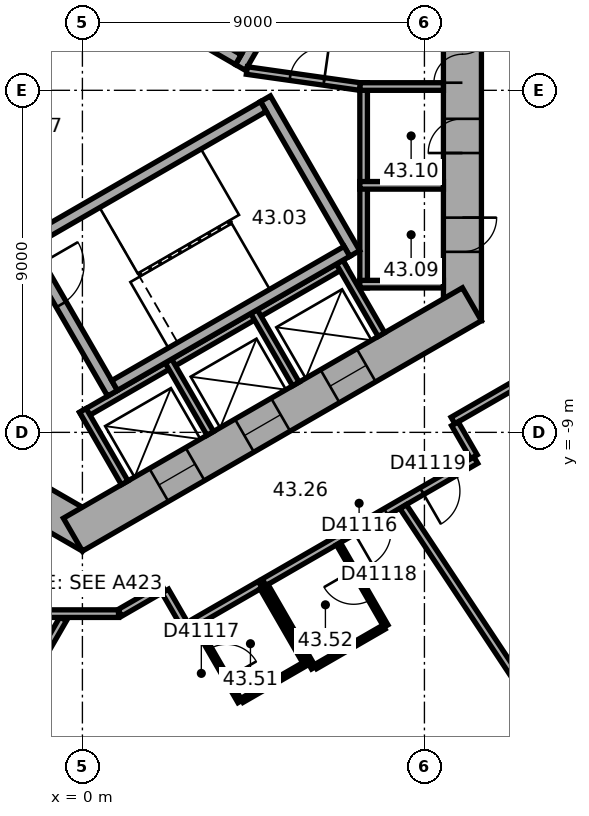
"""IFC4 building model, lengths in metres.
Left out: names, types, materials, properties, quantities, classifications, styles, units other than length and angle.
Written with IfcOpenShell. Run it as: python <this file> out.ifc"""

import sys

from ifc_helpers import new_model, si_unit, direction, frame, frame_2d, origin, place, context, subcontext, project, spatial, rectangle, extrude, element, fill, save


model = new_model("IFC4")
c1 = context("Model", 3, precision=1e-05, world=origin(), true_north=direction((0.0, 1.0)))
c2 = subcontext(c1, "Body", "Model", "MODEL_VIEW")
j1 = project(units=[si_unit("LENGTHUNIT", "METRE"), si_unit("PLANEANGLEUNIT", "RADIAN")], contexts=[c1])
p1 = place(None, origin())
s1 = spatial("IfcSite", under=j1, at=p1, CompositionType="ELEMENT")
p2 = place(p1, origin())
s2 = spatial("IfcBuilding", under=s1, at=p2, CompositionType="ELEMENT")
p3 = place(p2, frame((0.0, 0.0, 176.2)))
s3 = spatial("IfcBuildingStorey", under=s2, at=p3, CompositionType="ELEMENT", Elevation=176.2)
p4 = place(p3, frame((10.0, -6.062, 0.0), z_axis=(0.0, 0.0, 1.0), x_axis=(0.0, 1.0, 0.0)))
e1 = element("IfcWall", 1, at=p4, inside=s3, PredefinedType="SHEAR", context=c2, shape_type="SweptSolid", body=[
    extrude(rectangle(XDim=12.125, YDim=1.0, at=frame_2d((6.062, 0.0))), origin(), (0.0, 0.0, 1.0), 3.7),
])
p5 = place(p4, frame((6.262, 0.0, 0.0)))
e2 = element("IfcOpeningElement", 2, at=p5, cuts=e1, PredefinedType="OPENING", context=c2, shape_type="SweptSolid", body=[
    extrude(rectangle(XDim=1.5, YDim=2.1, at=frame_2d((0.75, 1.05))), frame((0.0, 0.51, 0.0), z_axis=(0.0, -1.0, 0.0), x_axis=(1.0, 0.0, 0.0)), (0.0, 0.0, 1.0), 1.02),
])
p6 = place(p4, frame((1.812, 0.0, 0.0)))
e3 = element("IfcOpeningElement", 3, at=p6, cuts=e1, PredefinedType="OPENING", context=c2, shape_type="SweptSolid", body=[
    extrude(rectangle(XDim=0.9, YDim=2.1, at=frame_2d((0.45, 1.05))), frame((0.0, 0.51, 0.0), z_axis=(0.0, -1.0, 0.0), x_axis=(1.0, 0.0, 0.0)), (0.0, 0.0, 1.0), 1.02),
])
p7 = place(p4, frame((4.412, 0.0, 0.0)))
e4 = element("IfcOpeningElement", 4, at=p7, cuts=e1, PredefinedType="OPENING", context=c2, shape_type="SweptSolid", body=[
    extrude(rectangle(XDim=0.9, YDim=2.1, at=frame_2d((0.45, 1.05))), frame((0.0, 0.51, 0.0), z_axis=(0.0, -1.0, 0.0), x_axis=(1.0, 0.0, 0.0)), (0.0, 0.0, 1.0), 1.02),
])
p8 = place(p3, frame((-10.25, -5.629, 0.0), z_axis=(0.0, 0.0, 1.0), x_axis=(0.866022616891, -0.50000482701, 0.0)))
e5 = element("IfcWall", 5, at=p8, inside=s3, PredefinedType="SHEAR", context=c2, shape_type="SweptSolid", body=[
    extrude(rectangle(XDim=12.125, YDim=1.0, at=frame_2d((6.062, 0.0))), origin(), (0.0, 0.0, 1.0), 3.7),
])
p9 = place(p8, frame((6.262, 0.0, 0.0)))
e6 = element("IfcOpeningElement", 6, at=p9, cuts=e5, PredefinedType="OPENING", context=c2, shape_type="SweptSolid", body=[
    extrude(rectangle(XDim=1.5, YDim=2.1, at=frame_2d((0.75, 1.05))), frame((0.0, 0.51, 0.0), z_axis=(0.0, -1.0, 0.0), x_axis=(1.0, 0.0, 0.0)), (0.0, 0.0, 1.0), 1.02),
])
p10 = place(p8, frame((1.712, 0.0, 0.0)))
e7 = element("IfcOpeningElement", 7, at=p10, cuts=e5, PredefinedType="OPENING", context=c2, shape_type="SweptSolid", body=[
    extrude(rectangle(XDim=1.1, YDim=2.1, at=frame_2d((0.55, 1.05))), frame((0.0, 0.51, 0.0), z_axis=(0.0, -1.0, 0.0), x_axis=(1.0, 0.0, 0.0)), (0.0, 0.0, 1.0), 1.02),
])
p11 = place(p8, frame((4.312, 0.0, 0.0)))
e8 = element("IfcOpeningElement", 8, at=p11, cuts=e5, PredefinedType="OPENING", context=c2, shape_type="SweptSolid", body=[
    extrude(rectangle(XDim=1.1, YDim=2.1, at=frame_2d((0.55, 1.05))), frame((0.0, 0.51, 0.0), z_axis=(0.0, -1.0, 0.0), x_axis=(1.0, 0.0, 0.0)), (0.0, 0.0, 1.0), 1.02),
])
p12 = place(p3, frame((-0.25, -11.691, 0.0), z_axis=(0.0, 0.0, 1.0), x_axis=(0.866022616891, 0.50000482701, 0.0)))
e9 = element("IfcWall", 9, at=p12, inside=s3, PredefinedType="SHEAR", context=c2, shape_type="SweptSolid", body=[
    extrude(rectangle(XDim=12.125, YDim=1.0, at=frame_2d((6.062, 0.0))), origin(), (0.0, 0.0, 1.0), 3.7),
])
p13 = place(p12, frame((2.612, 0.0, 0.0)))
e10 = element("IfcOpeningElement", 10, at=p13, cuts=e9, PredefinedType="OPENING", context=c2, shape_type="SweptSolid", body=[
    extrude(rectangle(XDim=1.1, YDim=2.1, at=frame_2d((0.55, 1.05))), frame((0.0, 0.51, 0.0), z_axis=(0.0, -1.0, 0.0), x_axis=(1.0, 0.0, 0.0)), (0.0, 0.0, 1.0), 1.02),
])
p14 = place(p12, frame((5.212, 0.0, 0.0)))
e11 = element("IfcOpeningElement", 11, at=p14, cuts=e9, PredefinedType="OPENING", context=c2, shape_type="SweptSolid", body=[
    extrude(rectangle(XDim=1.1, YDim=2.1, at=frame_2d((0.55, 1.05))), frame((0.0, 0.51, 0.0), z_axis=(0.0, -1.0, 0.0), x_axis=(1.0, 0.0, 0.0)), (0.0, 0.0, 1.0), 1.02),
])
p15 = place(p12, frame((7.812, 0.0, 0.0)))
e12 = element("IfcOpeningElement", 12, at=p15, cuts=e9, PredefinedType="OPENING", context=c2, shape_type="SweptSolid", body=[
    extrude(rectangle(XDim=1.1, YDim=2.1, at=frame_2d((0.55, 1.05))), frame((0.0, 0.51, 0.0), z_axis=(0.0, -1.0, 0.0), x_axis=(1.0, 0.0, 0.0)), (0.0, 0.0, 1.0), 1.02),
])
p16 = place(p3, frame((2.911, -24.156, 0.0), z_axis=(0.0, 0.0, 1.0), x_axis=(0.833882163564, 0.551942512668, 0.0)))
e13 = element("IfcWall", 13, at=p16, inside=s3, PredefinedType="STANDARD", context=c2, shape_type="SweptSolid", body=[
    extrude(rectangle(XDim=20.044, YDim=0.2, at=frame_2d((10.022, 0.0))), origin(), (0.0, 0.0, 1.0), 3.7),
])
p17 = place(p16, frame((1.313, 0.0, 0.9)))
e14 = element("IfcOpeningElement", 14, at=p17, cuts=e13, PredefinedType="OPENING", context=c2, shape_type="SweptSolid", body=[
    extrude(rectangle(XDim=2.4, YDim=2.0, at=frame_2d((1.2, 1.0))), frame((0.0, 0.11, 0.0), z_axis=(0.0, -1.0, 0.0), x_axis=(1.0, 0.0, 0.0)), (0.0, 0.0, 1.0), 0.22),
])
p18 = place(p16, frame((5.067, 0.0, 0.9)))
e15 = element("IfcOpeningElement", 15, at=p18, cuts=e13, PredefinedType="OPENING", context=c2, shape_type="SweptSolid", body=[
    extrude(rectangle(XDim=2.4, YDim=2.0, at=frame_2d((1.2, 1.0))), frame((0.0, 0.11, 0.0), z_axis=(0.0, -1.0, 0.0), x_axis=(1.0, 0.0, 0.0)), (0.0, 0.0, 1.0), 0.22),
])
p19 = place(p16, frame((8.821, 0.0, 0.9)))
e16 = element("IfcOpeningElement", 16, at=p19, cuts=e13, PredefinedType="OPENING", context=c2, shape_type="SweptSolid", body=[
    extrude(rectangle(XDim=2.4, YDim=2.0, at=frame_2d((1.2, 1.0))), frame((0.0, 0.11, 0.0), z_axis=(0.0, -1.0, 0.0), x_axis=(1.0, 0.0, 0.0)), (0.0, 0.0, 1.0), 0.22),
])
p20 = place(p16, frame((12.575, 0.0, 0.9)))
e17 = element("IfcOpeningElement", 17, at=p20, cuts=e13, PredefinedType="OPENING", context=c2, shape_type="SweptSolid", body=[
    extrude(rectangle(XDim=2.4, YDim=2.0, at=frame_2d((1.2, 1.0))), frame((0.0, 0.11, 0.0), z_axis=(0.0, -1.0, 0.0), x_axis=(1.0, 0.0, 0.0)), (0.0, 0.0, 1.0), 0.22),
])
p21 = place(p16, frame((16.329, 0.0, 0.9)))
e18 = element("IfcOpeningElement", 18, at=p21, cuts=e13, PredefinedType="OPENING", context=c2, shape_type="SweptSolid", body=[
    extrude(rectangle(XDim=2.4, YDim=2.0, at=frame_2d((1.2, 1.0))), frame((0.0, 0.11, 0.0), z_axis=(0.0, -1.0, 0.0), x_axis=(1.0, 0.0, 0.0)), (0.0, 0.0, 1.0), 0.22),
])
p22 = place(p3, frame((7.4, -5.2, 0.0), z_axis=(0.0, 0.0, 1.0), x_axis=(0.0, 1.0, 0.0)))
e19 = element("IfcWall", 19, at=p22, inside=s3, PredefinedType="PARTITIONING", context=c2, shape_type="SweptSolid", body=[
    extrude(rectangle(XDim=5.4, YDim=0.2, at=frame_2d((2.7, 0.0))), origin(), (0.0, 0.0, 1.0), 3.42),
])
for number, where, z_axis, x_axis in (
    (20, (7.3, -5.1, 0.0), (0.0, 0.0, 1.0), (1.0, 0.0, 0.0)),
    (21, (7.3, -2.5, 0.0), (0.0, 0.0, 1.0), (1.0, 0.0, 0.0)),
    (22, (7.3, 0.1, 0.0), (0.0, 0.0, 1.0), (1.0, 0.0, 0.0)),
):
    element("IfcWall", number, at=place(p3, frame(where, z_axis=z_axis, x_axis=x_axis)), inside=s3, PredefinedType="PARTITIONING", context=c2, shape_type="SweptSolid", body=[
        extrude(rectangle(XDim=2.2, YDim=0.2, at=frame_2d((1.1, 0.0))), origin(), (0.0, 0.0, 1.0), 3.42),
    ])
p23 = place(p3, frame((-0.024, -8.559, 0.0), z_axis=(0.0, 0.0, 1.0), x_axis=(0.866026010844, 0.49999894854, 0.0)))
e23 = element("IfcWall", 23, at=p23, inside=s3, PredefinedType="PARTITIONING", context=c2, shape_type="SweptSolid", body=[
    extrude(rectangle(XDim=8.0, YDim=0.2, at=frame_2d((4.0, 0.0))), origin(), (0.0, 0.0, 1.0), 3.42),
])
for number, where, z_axis, x_axis in (
    (24, (0.013, -8.422, 0.0), (0.0, 0.0, 1.0), (0.5, -0.866, 0.0)),
    (25, (2.264, -7.122, 0.0), (0.0, 0.0, 1.0), (0.5, -0.866, 0.0)),
    (26, (4.516, -5.822, 0.0), (0.0, 0.0, 1.0), (0.5, -0.866, 0.0)),
    (27, (6.768, -4.522, 0.0), (0.0, 0.0, 1.0), (0.5, -0.866, 0.0)),
):
    element("IfcWall", number, at=place(p3, frame(where, z_axis=z_axis, x_axis=x_axis)), inside=s3, PredefinedType="PARTITIONING", context=c2, shape_type="SweptSolid", body=[
        extrude(rectangle(XDim=2.2, YDim=0.2, at=frame_2d((1.1, 0.0))), origin(), (0.0, 0.0, 1.0), 3.42),
    ])
p24 = place(p3, frame((4.158, 0.602, 0.0), z_axis=(0.0, 0.0, 1.0), x_axis=(0.499977259774, 0.866038532462, 0.0)))
e28 = element("IfcWall", 28, at=p24, inside=s3, PredefinedType="SHEAR", context=c2, shape_type="SweptSolid", body=[
    extrude(rectangle(XDim=4.7, YDim=0.3, at=frame_2d((2.35, 0.0))), origin(), (0.0, 0.0, 1.0), 3.42),
])
p25 = place(p24, frame((0.8, 0.0, 0.0)))
e29 = element("IfcOpeningElement", 29, at=p25, cuts=e28, PredefinedType="OPENING", context=c2, shape_type="SweptSolid", body=[
    extrude(rectangle(XDim=1.2, YDim=2.1, at=frame_2d((0.6, 1.05))), frame((0.0, 0.16, 0.0), z_axis=(0.0, -1.0, 0.0), x_axis=(1.0, 0.0, 0.0)), (0.0, 0.0, 1.0), 0.32),
])
p26 = place(p3, frame((4.103, 0.807, 0.0), z_axis=(0.0, 0.0, 1.0), x_axis=(-0.866027801685, 0.499995846692, 0.0)))
e30 = element("IfcWall", 30, at=p26, inside=s3, PredefinedType="SHEAR", context=c2, shape_type="SweptSolid", body=[
    extrude(rectangle(XDim=7.06, YDim=0.3, at=frame_2d((3.53, 0.0))), origin(), (0.0, 0.0, 1.0), 3.42),
])
p27 = place(p3, frame((-1.558, -3.902, 0.0), z_axis=(0.0, 0.0, 1.0), x_axis=(0.499977259774, -0.866038532462, 0.0)))
e31 = element("IfcWall", 31, at=p27, inside=s3, PredefinedType="SHEAR", context=c2, shape_type="SweptSolid", body=[
    extrude(rectangle(XDim=4.7, YDim=0.3, at=frame_2d((2.35, 0.0))), origin(), (0.0, 0.0, 1.0), 3.42),
])
p28 = place(p27, frame((0.8, 0.0, 0.0)))
e32 = element("IfcOpeningElement", 32, at=p28, cuts=e31, PredefinedType="OPENING", context=c2, shape_type="SweptSolid", body=[
    extrude(rectangle(XDim=1.2, YDim=2.1, at=frame_2d((0.6, 1.05))), frame((0.0, 0.16, 0.0), z_axis=(0.0, -1.0, 0.0), x_axis=(1.0, 0.0, 0.0)), (0.0, 0.0, 1.0), 0.32),
])
p29 = place(p3, frame((4.816, -0.222, 0.0), z_axis=(0.0, 0.0, 1.0), x_axis=(0.499977259774, -0.866038532462, 0.0)))
e33 = element("IfcWall", 33, at=p29, inside=s3, PredefinedType="SHEAR", context=c2, shape_type="SweptSolid", body=[
    extrude(rectangle(XDim=4.7, YDim=0.3, at=frame_2d((2.35, 0.0))), origin(), (0.0, 0.0, 1.0), 3.42),
])
for number, where, z_axis, x_axis in (
    (34, (-1.353, -3.957, 0.0), (0.0, 0.0, 1.0), (0.866, 0.5, 0.0)),
    (35, (0.847, -7.767, 0.0), (0.0, 0.0, 1.0), (0.866, 0.5, 0.0)),
):
    element("IfcWall", number, at=place(p3, frame(where, z_axis=z_axis, x_axis=x_axis)), inside=s3, PredefinedType="SHEAR", context=c2, shape_type="SweptSolid", body=[
        extrude(rectangle(XDim=7.06, YDim=0.3, at=frame_2d((3.53, 0.0))), origin(), (0.0, 0.0, 1.0), 3.42),
    ])
p30 = place(p3, frame((4.327, 0.521, 0.0), z_axis=(0.0, 0.0, 1.0), x_axis=(0.990124376366, -0.14019172346, 0.0)))
e36 = element("IfcWall", 36, at=p30, inside=s3, PredefinedType="PARTITIONING", context=c2, shape_type="SweptSolid", body=[
    extrude(rectangle(XDim=3.002, YDim=0.2, at=frame_2d((1.501, 0.0))), origin(), (0.0, 0.0, 1.0), 3.42),
])
p31 = place(p30, frame((1.15, 0.0, 0.0)))
e37 = element("IfcOpeningElement", 37, at=p31, cuts=e36, PredefinedType="OPENING", context=c2, shape_type="SweptSolid", body=[
    extrude(rectangle(XDim=0.9, YDim=2.1, at=frame_2d((0.45, 1.05))), frame((0.0, 0.11, 0.0), z_axis=(0.0, -1.0, 0.0), x_axis=(1.0, 0.0, 0.0)), (0.0, 0.0, 1.0), 0.22),
])
p32 = place(p3, frame((-4.732, -21.228, 0.0), z_axis=(0.0, 0.0, 1.0), x_axis=(0.500000843414, 0.866024916838, 0.0)))
e38 = element("IfcWall", 38, at=p32, inside=s3, PredefinedType="PARTITIONING", context=c2, shape_type="SweptSolid", body=[
    extrude(rectangle(XDim=8.452, YDim=0.2, at=frame_2d((4.226, 0.0))), origin(), (0.0, 0.0, 1.0), 3.42),
])
p33 = place(p3, frame((-0.91, -13.77, 0.0), z_axis=(0.0, 0.0, 1.0), x_axis=(1.0, 0.0, 0.0)))
e39 = element("IfcWall", 39, at=p33, inside=s3, PredefinedType="PARTITIONING", context=c2, shape_type="SweptSolid", body=[
    extrude(rectangle(XDim=1.86, YDim=0.2, at=frame_2d((0.93, 0.0))), origin(), (0.0, 0.0, 1.0), 3.42),
])
p34 = place(p3, frame((0.985, -13.75, 0.0), z_axis=(0.0, 0.0, 1.0), x_axis=(0.866028661061, 0.499994358189, 0.0)))
e40 = element("IfcWall", 40, at=p34, inside=s3, PredefinedType="PARTITIONING", context=c2, shape_type="SweptSolid", body=[
    extrude(rectangle(XDim=1.321, YDim=0.2, at=frame_2d((0.661, 0.0))), origin(), (0.0, 0.0, 1.0), 3.42),
])
p35 = place(p3, frame((2.179, -13.176, 0.0), z_axis=(0.0, 0.0, 1.0), x_axis=(0.499978356969, -0.866037899034, 0.0)))
e41 = element("IfcWall", 41, at=p35, inside=s3, PredefinedType="PARTITIONING", context=c2, shape_type="SweptSolid", body=[
    extrude(rectangle(XDim=1.101, YDim=0.2, at=frame_2d((0.551, 0.0))), origin(), (0.0, 0.0, 1.0), 3.42),
])
p36 = place(p3, frame((2.946, -14.004, 0.0), z_axis=(0.0, 0.0, 1.0), x_axis=(0.866041268327, 0.499972520799, 0.0)))
e42 = element("IfcWall", 42, at=p36, inside=s3, PredefinedType="PARTITIONING", context=c2, shape_type="SweptSolid", body=[
    extrude(rectangle(XDim=2.0, YDim=0.2, at=frame_2d((1.0, 0.0))), origin(), (0.0, 0.0, 1.0), 3.42),
])
p37 = place(p3, frame((4.146, -16.083, 0.0), z_axis=(0.0, 0.0, 1.0), x_axis=(-0.499952165731, 0.866053019151, 0.0)))
e43 = element("IfcWall", 43, at=p37, inside=s3, PredefinedType="PARTITIONING", context=c2, shape_type="SweptSolid", body=[
    extrude(rectangle(XDim=2.3, YDim=0.12, at=frame_2d((1.15, 0.0))), origin(), (0.0, 0.0, 1.0), 3.42),
])
p38 = place(p37, frame((0.7, 0.0, 0.0)))
e44 = element("IfcOpeningElement", 44, at=p38, cuts=e43, PredefinedType="OPENING", context=c2, shape_type="SweptSolid", body=[
    extrude(rectangle(XDim=0.9, YDim=2.1, at=frame_2d((0.45, 1.05))), frame((0.0, 0.07, 0.0), z_axis=(0.0, -1.0, 0.0), x_axis=(1.0, 0.0, 0.0)), (0.0, 0.0, 1.0), 0.14),
])
p39 = place(p3, frame((4.728, -13.091, 0.0), z_axis=(0.0, 0.0, 1.0), x_axis=(0.500031774688, -0.866007057882, 0.0)))
e45 = element("IfcWall", 45, at=p39, inside=s3, PredefinedType="PARTITIONING", context=c2, shape_type="SweptSolid", body=[
    extrude(rectangle(XDim=2.3, YDim=0.12, at=frame_2d((1.15, 0.0))), origin(), (0.0, 0.0, 1.0), 3.42),
])
p40 = place(p3, frame((4.782, -12.944, 0.0), z_axis=(0.0, 0.0, 1.0), x_axis=(0.866022506829, 0.50000501764, 0.0)))
e46 = element("IfcWall", 46, at=p40, inside=s3, PredefinedType="PARTITIONING", context=c2, shape_type="SweptSolid", body=[
    extrude(rectangle(XDim=6.432, YDim=0.2, at=frame_2d((3.216, 0.0))), origin(), (0.0, 0.0, 1.0), 3.42),
])
p41 = place(p40, frame((2.704, 0.0, 0.0)))
e47 = element("IfcOpeningElement", 47, at=p41, cuts=e46, PredefinedType="OPENING", context=c2, shape_type="SweptSolid", body=[
    extrude(rectangle(XDim=1.0, YDim=2.1, at=frame_2d((0.5, 1.05))), frame((0.0, 0.11, 0.0), z_axis=(0.0, -1.0, 0.0), x_axis=(1.0, 0.0, 0.0)), (0.0, 0.0, 1.0), 0.22),
])
p42 = place(p40, frame((4.795, 0.0, 0.0)))
e48 = element("IfcOpeningElement", 48, at=p42, cuts=e46, PredefinedType="OPENING", context=c2, shape_type="SweptSolid", body=[
    extrude(rectangle(XDim=1.0, YDim=2.1, at=frame_2d((0.5, 1.05))), frame((0.0, 0.11, 0.0), z_axis=(0.0, -1.0, 0.0), x_axis=(1.0, 0.0, 0.0)), (0.0, 0.0, 1.0), 0.22),
])
p43 = place(p3, frame((5.826, -15.113, 0.0), z_axis=(0.0, 0.0, 1.0), x_axis=(-0.866045024864, -0.499966013754, 0.0)))
e49 = element("IfcWall", 49, at=p43, inside=s3, PredefinedType="PARTITIONING", context=c2, shape_type="SweptSolid", body=[
    extrude(rectangle(XDim=1.88, YDim=0.12, at=frame_2d((0.94, 0.0))), origin(), (0.0, 0.0, 1.0), 3.42),
])
p44 = place(p3, frame((6.082, -15.196, 0.0), z_axis=(0.0, 0.0, 1.0), x_axis=(-0.500004234368, 0.866022959057, 0.0)))
e50 = element("IfcWall", 50, at=p44, inside=s3, PredefinedType="PARTITIONING", context=c2, shape_type="SweptSolid", body=[
    extrude(rectangle(XDim=2.5, YDim=0.12, at=frame_2d((1.25, 0.0))), origin(), (0.0, 0.0, 1.0), 3.42),
])
p45 = place(p3, frame((6.737, -11.931, 0.0), z_axis=(0.0, 0.0, 1.0), x_axis=(0.500004234368, -0.866022959057, 0.0)))
e51 = element("IfcWall", 51, at=p45, inside=s3, PredefinedType="PARTITIONING", context=c2, shape_type="SweptSolid", body=[
    extrude(rectangle(XDim=2.5, YDim=0.12, at=frame_2d((1.25, 0.0))), origin(), (0.0, 0.0, 1.0), 3.42),
])
p46 = place(p45, frame((0.8, 0.0, 0.0)))
e52 = element("IfcOpeningElement", 52, at=p46, cuts=e51, PredefinedType="OPENING", context=c2, shape_type="SweptSolid", body=[
    extrude(rectangle(XDim=0.9, YDim=2.1, at=frame_2d((0.45, 1.05))), frame((0.0, 0.07, 0.0), z_axis=(0.0, -1.0, 0.0), x_axis=(1.0, 0.0, 0.0)), (0.0, 0.0, 1.0), 0.14),
])
p47 = place(p3, frame((7.935, -14.126, 0.0), z_axis=(0.0, 0.0, 1.0), x_axis=(-0.866009661879, -0.500027264788, 0.0)))
e53 = element("IfcWall", 53, at=p47, inside=s3, PredefinedType="PARTITIONING", context=c2, shape_type="SweptSolid", body=[
    extrude(rectangle(XDim=2.08, YDim=0.12, at=frame_2d((1.04, 0.0))), origin(), (0.0, 0.0, 1.0), 3.42),
])
p48 = place(p3, frame((9.752, -8.688, 0.0), z_axis=(0.0, 0.0, 1.0), x_axis=(0.865974105138, 0.500088841337, 0.0)))
e54 = element("IfcWall", 54, at=p48, inside=s3, PredefinedType="PARTITIONING", context=c2, shape_type="SweptSolid", body=[
    extrude(rectangle(XDim=1.961, YDim=0.2, at=frame_2d((0.98, 0.0))), origin(), (0.0, 0.0, 1.0), 3.42),
])
p49 = place(p3, frame((10.302, -9.642, 0.0), z_axis=(0.0, 0.0, 1.0), x_axis=(-0.500074377092, 0.865982457891, 0.0)))
e55 = element("IfcWall", 55, at=p49, inside=s3, PredefinedType="PARTITIONING", context=c2, shape_type="SweptSolid", body=[
    extrude(rectangle(XDim=1.001, YDim=0.2, at=frame_2d((0.5, 0.0))), origin(), (0.0, 0.0, 1.0), 3.42),
])
p50 = place(p3, frame((12.281, -16.755, 0.0), z_axis=(0.0, 0.0, 1.0), x_axis=(-0.551925794663, 0.833893228888, 0.0)))
e56 = element("IfcWall", 56, at=p50, inside=s3, PredefinedType="PARTITIONING", context=c2, shape_type="SweptSolid", body=[
    extrude(rectangle(XDim=6.953, YDim=0.2, at=frame_2d((3.476, 0.0))), origin(), (0.0, 0.0, 1.0), 3.42),
])
p51 = place(p5, origin())
e57 = element("IfcDoor", 57, at=p51, inside=s3, OperationType="DOUBLE_DOOR_SINGLE_SWING", PredefinedType="DOOR", context=c2, shape_type="SweptSolid", body=[
    extrude(rectangle(XDim=1.5, YDim=2.1, at=frame_2d((0.75, 1.05))), frame((0.0, 0.025, 0.0), z_axis=(0.0, -1.0, 0.0), x_axis=(1.0, 0.0, 0.0)), (0.0, 0.0, 1.0), 0.05),
])
fill(e2, e57)
p52 = place(p28, origin())
e58 = element("IfcDoor", 58, at=p52, inside=s3, OperationType="SINGLE_SWING_RIGHT", PredefinedType="DOOR", context=c2, shape_type="SweptSolid", body=[
    extrude(rectangle(XDim=1.2, YDim=2.1, at=frame_2d((0.6, 1.05))), frame((0.0, 0.025, 0.0), z_axis=(0.0, -1.0, 0.0), x_axis=(1.0, 0.0, 0.0)), (0.0, 0.0, 1.0), 0.05),
])
fill(e32, e58)
p53 = place(p31, origin())
e59 = element("IfcDoor", 59, at=p53, inside=s3, OperationType="SINGLE_SWING_LEFT", PredefinedType="DOOR", context=c2, shape_type="SweptSolid", body=[
    extrude(rectangle(XDim=0.9, YDim=2.1, at=frame_2d((0.45, 1.05))), frame((0.0, 0.025, 0.0), z_axis=(0.0, -1.0, 0.0), x_axis=(1.0, 0.0, 0.0)), (0.0, 0.0, 1.0), 0.05),
])
fill(e37, e59)
p54 = place(p6, origin())
e60 = element("IfcDoor", 60, at=p54, inside=s3, OperationType="SINGLE_SWING_LEFT", PredefinedType="DOOR", context=c2, shape_type="SweptSolid", body=[
    extrude(rectangle(XDim=0.9, YDim=2.1, at=frame_2d((0.45, 1.05))), frame((0.0, 0.025, 0.0), z_axis=(0.0, -1.0, 0.0), x_axis=(1.0, 0.0, 0.0)), (0.0, 0.0, 1.0), 0.05),
])
fill(e3, e60)
p55 = place(p7, origin())
e61 = element("IfcDoor", 61, at=p55, inside=s3, OperationType="SINGLE_SWING_LEFT", PredefinedType="DOOR", context=c2, shape_type="SweptSolid", body=[
    extrude(rectangle(XDim=0.9, YDim=2.1, at=frame_2d((0.45, 1.05))), frame((0.0, 0.025, 0.0), z_axis=(0.0, -1.0, 0.0), x_axis=(1.0, 0.0, 0.0)), (0.0, 0.0, 1.0), 0.05),
])
fill(e4, e61)
p56 = place(p13, origin())
e62 = element("IfcDoor", 62, at=p56, inside=s3, OperationType="DOUBLE_DOOR_SLIDING", PredefinedType="DOOR", context=c2, shape_type="SweptSolid", body=[
    extrude(rectangle(XDim=1.1, YDim=2.1, at=frame_2d((0.55, 1.05))), frame((0.0, 0.025, 0.0), z_axis=(0.0, -1.0, 0.0), x_axis=(1.0, 0.0, 0.0)), (0.0, 0.0, 1.0), 0.05),
])
fill(e10, e62)
p57 = place(p14, origin())
e63 = element("IfcDoor", 63, at=p57, inside=s3, OperationType="DOUBLE_DOOR_SLIDING", PredefinedType="DOOR", context=c2, shape_type="SweptSolid", body=[
    extrude(rectangle(XDim=1.1, YDim=2.1, at=frame_2d((0.55, 1.05))), frame((0.0, 0.025, 0.0), z_axis=(0.0, -1.0, 0.0), x_axis=(1.0, 0.0, 0.0)), (0.0, 0.0, 1.0), 0.05),
])
fill(e11, e63)
p58 = place(p15, origin())
e64 = element("IfcDoor", 64, at=p58, inside=s3, OperationType="DOUBLE_DOOR_SLIDING", PredefinedType="DOOR", context=c2, shape_type="SweptSolid", body=[
    extrude(rectangle(XDim=1.1, YDim=2.1, at=frame_2d((0.55, 1.05))), frame((0.0, 0.025, 0.0), z_axis=(0.0, -1.0, 0.0), x_axis=(1.0, 0.0, 0.0)), (0.0, 0.0, 1.0), 0.05),
])
fill(e12, e64)
p59 = place(p41, origin())
e65 = element("IfcDoor", 65, at=p59, inside=s3, OperationType="SINGLE_SWING_LEFT", PredefinedType="DOOR", context=c2, shape_type="SweptSolid", body=[
    extrude(rectangle(XDim=1.0, YDim=2.1, at=frame_2d((0.5, 1.05))), frame((0.0, 0.025, 0.0), z_axis=(0.0, -1.0, 0.0), x_axis=(1.0, 0.0, 0.0)), (0.0, 0.0, 1.0), 0.05),
])
fill(e47, e65)
p60 = place(p38, origin())
e66 = element("IfcDoor", 66, at=p60, inside=s3, OperationType="SINGLE_SWING_LEFT", PredefinedType="DOOR", context=c2, shape_type="SweptSolid", body=[
    extrude(rectangle(XDim=0.9, YDim=2.1, at=frame_2d((0.45, 1.05))), frame((0.0, 0.025, 0.0), z_axis=(0.0, -1.0, 0.0), x_axis=(1.0, 0.0, 0.0)), (0.0, 0.0, 1.0), 0.05),
])
fill(e44, e66)
p61 = place(p46, origin())
e67 = element("IfcDoor", 67, at=p61, inside=s3, OperationType="SINGLE_SWING_LEFT", PredefinedType="DOOR", context=c2, shape_type="SweptSolid", body=[
    extrude(rectangle(XDim=0.9, YDim=2.1, at=frame_2d((0.45, 1.05))), frame((0.0, 0.025, 0.0), z_axis=(0.0, -1.0, 0.0), x_axis=(1.0, 0.0, 0.0)), (0.0, 0.0, 1.0), 0.05),
])
fill(e52, e67)
p62 = place(p42, origin())
e68 = element("IfcDoor", 68, at=p62, inside=s3, OperationType="SINGLE_SWING_LEFT", PredefinedType="DOOR", context=c2, shape_type="SweptSolid", body=[
    extrude(rectangle(XDim=1.0, YDim=2.1, at=frame_2d((0.5, 1.05))), frame((0.0, 0.025, 0.0), z_axis=(0.0, -1.0, 0.0), x_axis=(1.0, 0.0, 0.0)), (0.0, 0.0, 1.0), 0.05),
])
fill(e48, e68)
save(model, sys.argv[1])
